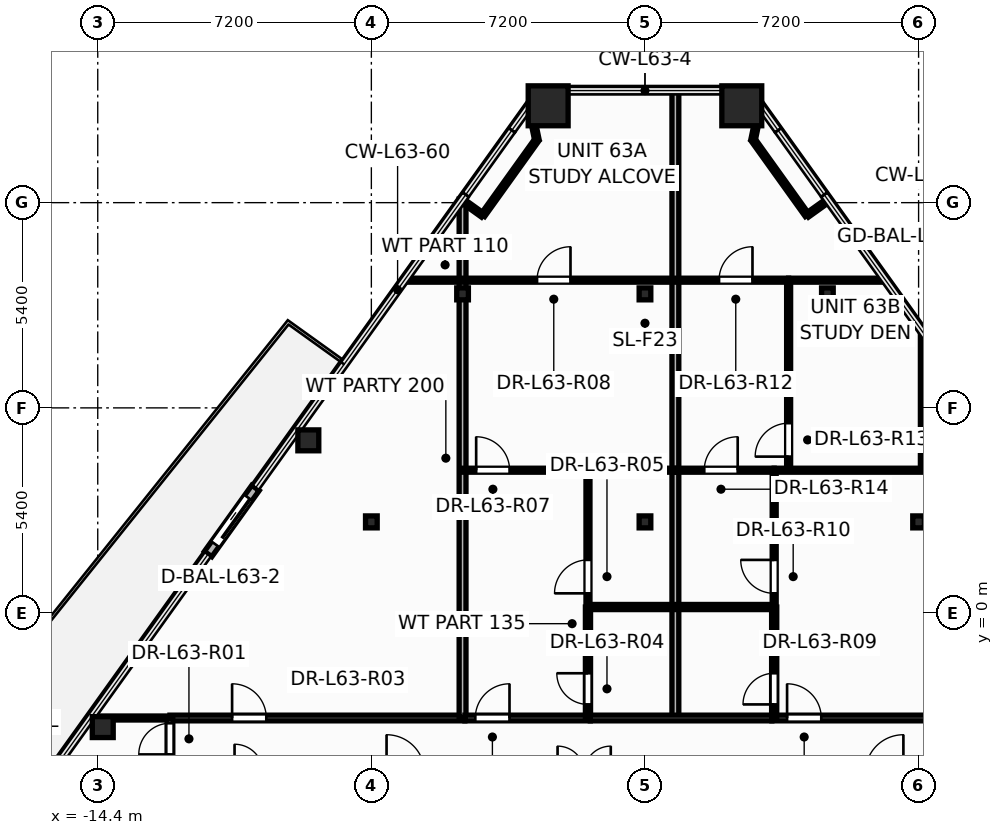
"""IFC4 building model, lengths in metres.
Left out: names, types, materials, properties, quantities, classifications, styles, units other than length and angle.
Written with IfcOpenShell. Run it as: python <this file> out.ifc"""

import sys

from ifc_helpers import new_model, si_unit, direction, frame, frame_2d, origin, origin_2d, place, context, subcontext, project, spatial, rectangle, hollow_rectangle, hollow_circle, i_section, extrude, element, fill, save


model = new_model("IFC4")
c1 = context("Model", 3, precision=1e-05, world=origin(), true_north=direction((0.0, 1.0)))
c2 = subcontext(c1, "Body", "Model", "MODEL_VIEW")
j1 = project(units=[si_unit("LENGTHUNIT", "METRE"), si_unit("PLANEANGLEUNIT", "RADIAN")], contexts=[c1])
p1 = place(None, origin())
s1 = spatial("IfcSite", under=j1, at=p1, CompositionType="ELEMENT")
p2 = place(p1, origin())
s2 = spatial("IfcBuilding", under=s1, at=p2, CompositionType="ELEMENT")
p3 = place(p2, frame((0.0, 0.0, 240.6)))
s3 = spatial("IfcBuildingStorey", under=s2, at=p3, CompositionType="ELEMENT", Elevation=240.6)
for number, where, z_axis, x_axis in (
    (1, (2.548, 13.349, 0.0), (0.0, 0.0, 1.0), (1.0, 0.0, 0.0)),
    (2, (-2.548, 13.349, 0.0), (0.0, 0.0, 1.0), (1.0, 0.0, 0.0)),
):
    element("IfcColumn", number, at=place(p3, frame(where, z_axis=z_axis, x_axis=x_axis)), inside=s3, PredefinedType="COLUMN", context=c2, shape_type="SweptSolid", body=[
        extrude(hollow_rectangle(XDim=1.05, YDim=1.05, WallThickness=0.045, at=origin_2d()), origin(), (0.0, 0.0, 1.0), 3.6),
    ])
for number, where, z_axis, x_axis in (
    (3, (-8.858, 4.546, 0.0), (0.0, 0.0, 1.0), (1.0, 0.0, 0.0)),
    (4, (-14.268, -2.999, 0.0), (0.0, 0.0, 1.0), (1.0, 0.0, 0.0)),
):
    element("IfcColumn", number, at=place(p3, frame(where, z_axis=z_axis, x_axis=x_axis)), inside=s3, PredefinedType="COLUMN", context=c2, shape_type="SweptSolid", body=[
        extrude(hollow_circle(Radius=0.275, WallThickness=0.024, at=origin_2d()), origin(), (0.0, 0.0, 1.0), 3.6),
    ])
for number, where, z_axis, x_axis in (
    (5, (-7.2, 2.4, 0.0), (0.0, 0.0, 1.0), (1.0, 0.0, 0.0)),
    (6, (0.0, 2.4, 0.0), (0.0, 0.0, 1.0), (1.0, 0.0, 0.0)),
    (7, (7.2, 2.4, 0.0), (0.0, 0.0, 1.0), (1.0, 0.0, 0.0)),
    (8, (-4.8, 8.4, 0.0), (0.0, 0.0, 1.0), (1.0, 0.0, 0.0)),
    (9, (0.0, 8.4, 0.0), (0.0, 0.0, 1.0), (1.0, 0.0, 0.0)),
    (10, (4.8, 8.4, 0.0), (0.0, 0.0, 1.0), (1.0, 0.0, 0.0)),
):
    element("IfcColumn", number, at=place(p3, frame(where, z_axis=z_axis, x_axis=x_axis)), inside=s3, PredefinedType="COLUMN", context=c2, shape_type="SweptSolid", body=[
        extrude(i_section(OverallWidth=0.307, OverallDepth=0.314, WebThickness=0.012, FlangeThickness=0.019, at=origin_2d()), origin(), (0.0, 0.0, 1.0), 3.6),
    ])
p4 = place(p3, frame((-10.249, 3.293, -0.015), z_axis=(0.0, 0.0, 1.0), x_axis=(-0.58265081445, -0.812722602381, 0.0)))
e11 = element("IfcWall", 11, at=p4, inside=s3, PredefinedType="STANDARD", context=c2, shape_type="SweptSolid", body=[
    extrude(rectangle(XDim=2.14, YDim=0.24, at=frame_2d((1.07, 0.0))), origin(), (0.0, 0.0, 1.0), 2.813),
])
p5 = place(p4, frame((0.32, 0.0, 0.015)))
e12 = element("IfcOpeningElement", 12, at=p5, cuts=e11, PredefinedType="OPENING", context=c2, shape_type="SweptSolid", body=[
    extrude(rectangle(XDim=1.506, YDim=2.204, at=frame_2d((0.75, 1.102))), frame((0.0, 0.13, 0.0), z_axis=(0.0, -1.0, 0.0), x_axis=(1.0, 0.0, 0.0)), (0.0, 0.0, 1.0), 0.26),
])
p6 = place(p3, frame((3.34, -2.76, 0.0), z_axis=(0.0, 0.0, 1.0), x_axis=(1.0, 0.0, 0.0)))
e13 = element("IfcWall", 13, at=p6, inside=s3, PredefinedType="PARTITIONING", context=c2, shape_type="SweptSolid", body=[
    extrude(rectangle(XDim=9.16, YDim=0.15, at=frame_2d((4.58, 0.0))), origin(), (0.0, 0.0, 1.0), 2.255),
])
p7 = place(p6, frame((0.399, 0.0, 0.0)))
e14 = element("IfcOpeningElement", 14, at=p7, cuts=e13, PredefinedType="OPENING", context=c2, shape_type="SweptSolid", body=[
    extrude(rectangle(XDim=0.906, YDim=2.104, at=frame_2d((0.45, 1.052))), frame((0.0, 0.085, 0.0), z_axis=(0.0, -1.0, 0.0), x_axis=(1.0, 0.0, 0.0)), (0.0, 0.0, 1.0), 0.17),
])
p8 = place(p3, frame((-12.5, -2.76, 0.0), z_axis=(0.0, 0.0, 1.0), x_axis=(1.0, 0.0, 0.0)))
e15 = element("IfcWall", 15, at=p8, inside=s3, PredefinedType="PARTITIONING", context=c2, shape_type="SweptSolid", body=[
    extrude(rectangle(XDim=7.76, YDim=0.15, at=frame_2d((3.88, 0.0))), origin(), (0.0, 0.0, 1.0), 2.255),
])
p9 = place(p8, frame((1.635, 0.0, 0.0)))
e16 = element("IfcOpeningElement", 16, at=p9, cuts=e15, PredefinedType="OPENING", context=c2, shape_type="SweptSolid", body=[
    extrude(rectangle(XDim=0.906, YDim=2.104, at=frame_2d((0.45, 1.052))), frame((0.0, 0.085, 0.0), z_axis=(0.0, -1.0, 0.0), x_axis=(1.0, 0.0, 0.0)), (0.0, 0.0, 1.0), 0.17),
])
p10 = place(p3, frame((-4.8, -2.74, 0.0), z_axis=(0.0, 0.0, 1.0), x_axis=(0.0, 1.0, 0.0)))
e17 = element("IfcWall", 17, at=p10, inside=s3, PredefinedType="PARTITIONING", context=c2, shape_type="SweptSolid", body=[
    extrude(rectangle(XDim=13.633, YDim=0.18, at=frame_2d((6.817, 0.0))), origin(), (0.0, 0.0, 1.0), 2.255),
])
p11 = place(p3, frame((-6.329, 8.76, 0.0), z_axis=(0.0, 0.0, 1.0), x_axis=(1.0, 0.0, 0.0)))
e18 = element("IfcWall", 18, at=p11, inside=s3, PredefinedType="PARTITIONING", context=c2, shape_type="SweptSolid", body=[
    extrude(rectangle(XDim=7.129, YDim=0.105, at=frame_2d((3.565, 0.0))), origin(), (0.0, 0.0, 1.0), 2.653),
])
p12 = place(p11, frame((3.49, 0.0, 0.0)))
e19 = element("IfcOpeningElement", 19, at=p12, cuts=e18, PredefinedType="OPENING", context=c2, shape_type="SweptSolid", body=[
    extrude(rectangle(XDim=0.886, YDim=2.104, at=frame_2d((0.44, 1.052))), frame((0.0, 0.062, 0.0), z_axis=(0.0, -1.0, 0.0), x_axis=(1.0, 0.0, 0.0)), (0.0, 0.0, 1.0), 0.125),
])
p13 = place(p3, frame((0.8, -2.76, 0.0), z_axis=(0.0, 0.0, 1.0), x_axis=(0.0, 1.0, 0.0)))
e20 = element("IfcWall", 20, at=p13, inside=s3, PredefinedType="PARTITIONING", context=c2, shape_type="SweptSolid", body=[
    extrude(rectangle(XDim=16.509, YDim=0.18, at=frame_2d((8.254, 0.0))), origin(), (0.0, 0.0, 1.0), 2.255),
])
p14 = place(p3, frame((3.78, 3.76, 0.0), z_axis=(0.0, 0.0, 1.0), x_axis=(0.0, 1.0, 0.0)))
e21 = element("IfcWall", 21, at=p14, inside=s3, PredefinedType="PARTITIONING", context=c2, shape_type="SweptSolid", body=[
    extrude(rectangle(XDim=5.0, YDim=0.105, at=frame_2d((2.5, 0.0))), origin(), (0.0, 0.0, 1.0), 2.653),
])
p15 = place(p14, frame((0.358, 0.0, 0.0)))
e22 = element("IfcOpeningElement", 22, at=p15, cuts=e21, PredefinedType="OPENING", context=c2, shape_type="SweptSolid", body=[
    extrude(rectangle(XDim=0.886, YDim=2.104, at=frame_2d((0.44, 1.052))), frame((0.0, 0.062, 0.0), z_axis=(0.0, -1.0, 0.0), x_axis=(1.0, 0.0, 0.0)), (0.0, 0.0, 1.0), 0.125),
])
p16 = place(p3, frame((7.3, 3.76, 0.0), z_axis=(0.0, 0.0, 1.0), x_axis=(0.0, 1.0, 0.0)))
e23 = element("IfcWall", 23, at=p16, inside=s3, PredefinedType="PARTITIONING", context=c2, shape_type="SweptSolid", body=[
    extrude(rectangle(XDim=3.646, YDim=0.105, at=frame_2d((1.823, 0.0))), origin(), (0.0, 0.0, 1.0), 2.653),
])
p17 = place(p3, frame((-1.5, 0.16, 0.0), z_axis=(0.0, 0.0, 1.0), x_axis=(0.0, 1.0, 0.0)))
e24 = element("IfcWall", 24, at=p17, inside=s3, PredefinedType="PARTITIONING", context=c2, shape_type="SweptSolid", body=[
    extrude(rectangle(XDim=3.6, YDim=0.105, at=frame_2d((1.8, 0.0))), origin(), (0.0, 0.0, 1.0), 2.255),
])
p18 = place(p17, frame((0.36, 0.0, 0.0)))
e25 = element("IfcOpeningElement", 25, at=p18, cuts=e24, PredefinedType="OPENING", context=c2, shape_type="SweptSolid", body=[
    extrude(rectangle(XDim=0.886, YDim=2.104, at=frame_2d((0.44, 1.052))), frame((0.0, 0.062, 0.0), z_axis=(0.0, -1.0, 0.0), x_axis=(1.0, 0.0, 0.0)), (0.0, 0.0, 1.0), 0.125),
])
p19 = place(p3, frame((3.4, 0.16, 0.0), z_axis=(0.0, 0.0, 1.0), x_axis=(0.0, 1.0, 0.0)))
e26 = element("IfcWall", 26, at=p19, inside=s3, PredefinedType="PARTITIONING", context=c2, shape_type="SweptSolid", body=[
    extrude(rectangle(XDim=3.6, YDim=0.105, at=frame_2d((1.8, 0.0))), origin(), (0.0, 0.0, 1.0), 2.255),
])
p20 = place(p19, frame((0.36, 0.0, 0.0)))
e27 = element("IfcOpeningElement", 27, at=p20, cuts=e26, PredefinedType="OPENING", context=c2, shape_type="SweptSolid", body=[
    extrude(rectangle(XDim=0.886, YDim=2.104, at=frame_2d((0.44, 1.052))), frame((0.0, 0.062, 0.0), z_axis=(0.0, -1.0, 0.0), x_axis=(1.0, 0.0, 0.0)), (0.0, 0.0, 1.0), 0.125),
])
p21 = place(p3, frame((3.4, 3.76, 0.0), z_axis=(0.0, 0.0, 1.0), x_axis=(1.0, 0.0, 0.0)))
e28 = element("IfcWall", 28, at=p21, inside=s3, PredefinedType="PARTITIONING", context=c2, shape_type="SweptSolid", body=[
    extrude(rectangle(XDim=3.9, YDim=0.105, at=frame_2d((1.95, 0.0))), origin(), (0.0, 0.0, 1.0), 2.653),
])
p22 = place(p3, frame((-4.738, -2.76, 0.0), z_axis=(0.0, 0.0, 1.0), x_axis=(1.0, 0.0, 0.0)))
e29 = element("IfcWall", 29, at=p22, inside=s3, PredefinedType="PARTITIONING", context=c2, shape_type="SweptSolid", body=[
    extrude(rectangle(XDim=3.298, YDim=0.15, at=frame_2d((1.649, 0.0))), origin(), (0.0, 0.0, 1.0), 2.899),
])
p23 = place(p22, frame((0.273, 0.0, 0.0)))
e30 = element("IfcOpeningElement", 30, at=p23, cuts=e29, PredefinedType="OPENING", context=c2, shape_type="SweptSolid", body=[
    extrude(rectangle(XDim=0.906, YDim=2.104, at=frame_2d((0.45, 1.052))), frame((0.0, 0.085, 0.0), z_axis=(0.0, -1.0, 0.0), x_axis=(1.0, 0.0, 0.0)), (0.0, 0.0, 1.0), 0.17),
])
p24 = place(p3, frame((-4.8, 3.76, 0.0), z_axis=(0.0, 0.0, 1.0), x_axis=(1.0, 0.0, 0.0)))
e31 = element("IfcWall", 31, at=p24, inside=s3, PredefinedType="PARTITIONING", context=c2, shape_type="SweptSolid", body=[
    extrude(rectangle(XDim=3.3, YDim=0.105, at=frame_2d((1.65, 0.0))), origin(), (0.0, 0.0, 1.0), 2.899),
])
p25 = place(p24, frame((0.358, 0.0, 0.0)))
e32 = element("IfcOpeningElement", 32, at=p25, cuts=e31, PredefinedType="OPENING", context=c2, shape_type="SweptSolid", body=[
    extrude(rectangle(XDim=0.886, YDim=2.104, at=frame_2d((0.44, 1.052))), frame((0.0, 0.062, 0.0), z_axis=(0.0, -1.0, 0.0), x_axis=(1.0, 0.0, 0.0)), (0.0, 0.0, 1.0), 0.125),
])
p26 = place(p3, frame((0.8, 8.76, 0.0), z_axis=(0.0, 0.0, 1.0), x_axis=(1.0, 0.0, 0.0)))
e33 = element("IfcWall", 33, at=p26, inside=s3, PredefinedType="PARTITIONING", context=c2, shape_type="SweptSolid", body=[
    extrude(rectangle(XDim=2.98, YDim=0.105, at=frame_2d((1.49, 0.0))), origin(), (0.0, 0.0, 1.0), 3.28),
])
p27 = place(p26, frame((1.149, 0.0, 0.0)))
e34 = element("IfcOpeningElement", 34, at=p27, cuts=e33, PredefinedType="OPENING", context=c2, shape_type="SweptSolid", body=[
    extrude(rectangle(XDim=0.886, YDim=2.104, at=frame_2d((0.44, 1.052))), frame((0.0, 0.062, 0.0), z_axis=(0.0, -1.0, 0.0), x_axis=(1.0, 0.0, 0.0)), (0.0, 0.0, 1.0), 0.125),
])
p28 = place(p3, frame((-1.5, -2.76, 0.0), z_axis=(0.0, 0.0, 1.0), x_axis=(0.0, 1.0, 0.0)))
e35 = element("IfcWall", 35, at=p28, inside=s3, PredefinedType="PARTITIONING", context=c2, shape_type="SweptSolid", body=[
    extrude(rectangle(XDim=2.92, YDim=0.135, at=frame_2d((1.46, 0.0))), origin(), (0.0, 0.0, 1.0), 3.28),
])
p29 = place(p28, frame((0.357, 0.0, 0.0)))
e36 = element("IfcOpeningElement", 36, at=p29, cuts=e35, PredefinedType="OPENING", context=c2, shape_type="SweptSolid", body=[
    extrude(rectangle(XDim=0.826, YDim=2.104, at=frame_2d((0.41, 1.052))), frame((0.0, 0.078, 0.0), z_axis=(0.0, -1.0, 0.0), x_axis=(1.0, 0.0, 0.0)), (0.0, 0.0, 1.0), 0.155),
])
p30 = place(p3, frame((3.4, -2.76, 0.0), z_axis=(0.0, 0.0, 1.0), x_axis=(0.0, 1.0, 0.0)))
e37 = element("IfcWall", 37, at=p30, inside=s3, PredefinedType="PARTITIONING", context=c2, shape_type="SweptSolid", body=[
    extrude(rectangle(XDim=2.92, YDim=0.135, at=frame_2d((1.46, 0.0))), origin(), (0.0, 0.0, 1.0), 3.28),
])
p31 = place(p30, frame((0.357, 0.0, 0.0)))
e38 = element("IfcOpeningElement", 38, at=p31, cuts=e37, PredefinedType="OPENING", context=c2, shape_type="SweptSolid", body=[
    extrude(rectangle(XDim=0.826, YDim=2.104, at=frame_2d((0.41, 1.052))), frame((0.0, 0.078, 0.0), z_axis=(0.0, -1.0, 0.0), x_axis=(1.0, 0.0, 0.0)), (0.0, 0.0, 1.0), 0.155),
])
p32 = place(p3, frame((-1.438, -2.76, 0.0), z_axis=(0.0, 0.0, 1.0), x_axis=(1.0, 0.0, 0.0)))
e39 = element("IfcWall", 39, at=p32, inside=s3, PredefinedType="PARTITIONING", context=c2, shape_type="SweptSolid", body=[
    extrude(rectangle(XDim=4.776, YDim=0.15, at=frame_2d((2.388, 0.0))), origin(), (0.0, 0.0, 1.0), 2.255),
])
p33 = place(p3, frame((-1.5, 0.16, 0.0), z_axis=(0.0, 0.0, 1.0), x_axis=(1.0, 0.0, 0.0)))
e40 = element("IfcWall", 40, at=p33, inside=s3, PredefinedType="PARTITIONING", context=c2, shape_type="SweptSolid", body=[
    extrude(rectangle(XDim=4.9, YDim=0.135, at=frame_2d((2.45, 0.0))), origin(), (0.0, 0.0, 1.0), 2.255),
])
p34 = place(p3, frame((0.8, 3.76, 0.0), z_axis=(0.0, 0.0, 1.0), x_axis=(1.0, 0.0, 0.0)))
e41 = element("IfcWall", 41, at=p34, inside=s3, PredefinedType="PARTITIONING", context=c2, shape_type="SweptSolid", body=[
    extrude(rectangle(XDim=2.6, YDim=0.105, at=frame_2d((1.3, 0.0))), origin(), (0.0, 0.0, 1.0), 2.899),
])
p35 = place(p34, frame((0.76, 0.0, 0.0)))
e42 = element("IfcOpeningElement", 42, at=p35, cuts=e41, PredefinedType="OPENING", context=c2, shape_type="SweptSolid", body=[
    extrude(rectangle(XDim=0.886, YDim=2.104, at=frame_2d((0.44, 1.052))), frame((0.0, 0.062, 0.0), z_axis=(0.0, -1.0, 0.0), x_axis=(1.0, 0.0, 0.0)), (0.0, 0.0, 1.0), 0.125),
])
p36 = place(p3, frame((3.78, 8.76, 0.0), z_axis=(0.0, 0.0, 1.0), x_axis=(1.0, 0.0, 0.0)))
e43 = element("IfcWall", 43, at=p36, inside=s3, PredefinedType="PARTITIONING", context=c2, shape_type="SweptSolid", body=[
    extrude(rectangle(XDim=2.549, YDim=0.105, at=frame_2d((1.275, 0.0))), origin(), (0.0, 0.0, 1.0), 2.653),
])
for number, where, z_axis, x_axis in (
    (44, (-2.845, 12.453, 0.0), (0.0, 0.0, 1.0), (-0.583, -0.813, 0.0)),
    (45, (4.268, 10.469, 0.0), (0.0, 0.0, 1.0), (-0.583, 0.813, 0.0)),
):
    element("IfcWall", number, at=place(p3, frame(where, z_axis=z_axis, x_axis=x_axis)), inside=s3, PredefinedType="PARTITIONING", context=c2, shape_type="SweptSolid", body=[
        extrude(rectangle(XDim=2.441, YDim=0.12, at=frame_2d((1.221, 0.0))), origin(), (0.0, 0.0, 1.0), 2.653),
    ])
p37 = place(p3, frame((-1.5, 3.76, 0.0), z_axis=(0.0, 0.0, 1.0), x_axis=(1.0, 0.0, 0.0)))
e46 = element("IfcWall", 46, at=p37, inside=s3, PredefinedType="PARTITIONING", context=c2, shape_type="SweptSolid", body=[
    extrude(rectangle(XDim=2.3, YDim=0.105, at=frame_2d((1.15, 0.0))), origin(), (0.0, 0.0, 1.0), 2.255),
])
p38 = place(p3, frame((-14.588, -2.76, 0.0), z_axis=(0.0, 0.0, 1.0), x_axis=(1.0, 0.0, 0.0)))
e47 = element("IfcWall", 47, at=p38, inside=s3, PredefinedType="PARTITIONING", context=c2, shape_type="SweptSolid", body=[
    extrude(rectangle(XDim=2.088, YDim=0.105, at=frame_2d((1.044, 0.0))), origin(), (0.0, 0.0, 1.0), 2.653),
])
p39 = place(p3, frame((-12.5, -4.24, 0.0), z_axis=(0.0, 0.0, 1.0), x_axis=(0.0, 1.0, 0.0)))
e48 = element("IfcWall", 48, at=p39, inside=s3, PredefinedType="PARTITIONING", context=c2, shape_type="SweptSolid", body=[
    extrude(rectangle(XDim=1.48, YDim=0.15, at=frame_2d((0.74, 0.0))), origin(), (0.0, 0.0, 1.0), 2.255),
])
p40 = place(p39, frame((0.522, 0.0, 0.0)))
e49 = element("IfcOpeningElement", 49, at=p40, cuts=e48, PredefinedType="OPENING", context=c2, shape_type="SweptSolid", body=[
    extrude(rectangle(XDim=0.826, YDim=2.104, at=frame_2d((0.41, 1.052))), frame((0.0, 0.085, 0.0), z_axis=(0.0, -1.0, 0.0), x_axis=(1.0, 0.0, 0.0)), (0.0, 0.0, 1.0), 0.17),
])
for number, where, z_axis, x_axis in (
    (50, (-3.017, 13.283, 0.0), (0.0, 0.0, 1.0), (0.203, -0.979, 0.0)),
    (51, (2.845, 12.453, 0.0), (0.0, 0.0, 1.0), (0.203, 0.979, 0.0)),
):
    element("IfcWall", number, at=place(p3, frame(where, z_axis=z_axis, x_axis=x_axis)), inside=s3, PredefinedType="PARTITIONING", context=c2, shape_type="SweptSolid", body=[
        extrude(rectangle(XDim=0.848, YDim=0.12, at=frame_2d((0.424, 0.0))), origin(), (0.0, 0.0, 1.0), 2.653),
    ])
for number, where, z_axis, x_axis in (
    (52, (-4.268, 10.469, 0.0), (0.0, 0.0, 1.0), (-0.813, 0.583, 0.0)),
    (53, (4.812, 10.859, 0.0), (0.0, 0.0, 1.0), (-0.813, -0.583, 0.0)),
):
    element("IfcWall", number, at=place(p3, frame(where, z_axis=z_axis, x_axis=x_axis)), inside=s3, PredefinedType="PARTITIONING", context=c2, shape_type="SweptSolid", body=[
        extrude(rectangle(XDim=0.67, YDim=0.12, at=frame_2d((0.335, 0.0))), origin(), (0.0, 0.0, 1.0), 2.798),
    ])
p41 = place(p5, origin())
e54 = element("IfcDoor", 54, at=p41, inside=s3, OperationType="SLIDING_TO_RIGHT", PredefinedType="DOOR", context=c2, shape_type="SweptSolid", body=[
    extrude(rectangle(XDim=1.5, YDim=2.2, at=frame_2d((0.75, 1.1))), frame((0.0, 0.025, 0.0), z_axis=(0.0, -1.0, 0.0), x_axis=(1.0, 0.0, 0.0)), (0.0, 0.0, 1.0), 0.05),
])
fill(e12, e54)
p42 = place(p40, origin())
e55 = element("IfcDoor", 55, at=p42, inside=s3, OperationType="SINGLE_SWING_LEFT", PredefinedType="DOOR", context=c2, shape_type="SweptSolid", body=[
    extrude(rectangle(XDim=0.82, YDim=2.1, at=frame_2d((0.41, 1.05))), frame((0.0, 0.025, 0.0), z_axis=(0.0, -1.0, 0.0), x_axis=(1.0, 0.0, 0.0)), (0.0, 0.0, 1.0), 0.05),
])
fill(e49, e55)
p43 = place(p9, origin())
e56 = element("IfcDoor", 56, at=p43, inside=s3, OperationType="SINGLE_SWING_LEFT", PredefinedType="DOOR", context=c2, shape_type="SweptSolid", body=[
    extrude(rectangle(XDim=0.9, YDim=2.1, at=frame_2d((0.45, 1.05))), frame((0.0, 0.025, 0.0), z_axis=(0.0, -1.0, 0.0), x_axis=(1.0, 0.0, 0.0)), (0.0, 0.0, 1.0), 0.05),
])
fill(e16, e56)
p44 = place(p29, origin())
e57 = element("IfcDoor", 57, at=p44, inside=s3, OperationType="SINGLE_SWING_RIGHT", PredefinedType="DOOR", context=c2, shape_type="SweptSolid", body=[
    extrude(rectangle(XDim=0.82, YDim=2.1, at=frame_2d((0.41, 1.05))), frame((0.0, 0.025, 0.0), z_axis=(0.0, -1.0, 0.0), x_axis=(1.0, 0.0, 0.0)), (0.0, 0.0, 1.0), 0.05),
])
fill(e36, e57)
p45 = place(p18, origin())
e58 = element("IfcDoor", 58, at=p45, inside=s3, OperationType="SINGLE_SWING_LEFT", PredefinedType="DOOR", context=c2, shape_type="SweptSolid", body=[
    extrude(rectangle(XDim=0.88, YDim=2.1, at=frame_2d((0.44, 1.05))), frame((0.0, 0.025, 0.0), z_axis=(0.0, -1.0, 0.0), x_axis=(1.0, 0.0, 0.0)), (0.0, 0.0, 1.0), 0.05),
])
fill(e25, e58)
p46 = place(p23, origin())
e59 = element("IfcDoor", 59, at=p46, inside=s3, OperationType="SINGLE_SWING_RIGHT", PredefinedType="DOOR", context=c2, shape_type="SweptSolid", body=[
    extrude(rectangle(XDim=0.9, YDim=2.1, at=frame_2d((0.45, 1.05))), frame((0.0, 0.025, 0.0), z_axis=(0.0, -1.0, 0.0), x_axis=(1.0, 0.0, 0.0)), (0.0, 0.0, 1.0), 0.05),
])
fill(e30, e59)
p47 = place(p25, origin())
e60 = element("IfcDoor", 60, at=p47, inside=s3, OperationType="SINGLE_SWING_LEFT", PredefinedType="DOOR", context=c2, shape_type="SweptSolid", body=[
    extrude(rectangle(XDim=0.88, YDim=2.1, at=frame_2d((0.44, 1.05))), frame((0.0, 0.025, 0.0), z_axis=(0.0, -1.0, 0.0), x_axis=(1.0, 0.0, 0.0)), (0.0, 0.0, 1.0), 0.05),
])
fill(e32, e60)
p48 = place(p12, origin())
e61 = element("IfcDoor", 61, at=p48, inside=s3, OperationType="SINGLE_SWING_RIGHT", PredefinedType="DOOR", context=c2, shape_type="SweptSolid", body=[
    extrude(rectangle(XDim=0.88, YDim=2.1, at=frame_2d((0.44, 1.05))), frame((0.0, 0.025, 0.0), z_axis=(0.0, -1.0, 0.0), x_axis=(1.0, 0.0, 0.0)), (0.0, 0.0, 1.0), 0.05),
])
fill(e19, e61)
p49 = place(p31, origin())
e62 = element("IfcDoor", 62, at=p49, inside=s3, OperationType="SINGLE_SWING_LEFT", PredefinedType="DOOR", context=c2, shape_type="SweptSolid", body=[
    extrude(rectangle(XDim=0.82, YDim=2.1, at=frame_2d((0.41, 1.05))), frame((0.0, 0.025, 0.0), z_axis=(0.0, -1.0, 0.0), x_axis=(1.0, 0.0, 0.0)), (0.0, 0.0, 1.0), 0.05),
])
fill(e38, e62)
p50 = place(p20, origin())
e63 = element("IfcDoor", 63, at=p50, inside=s3, OperationType="SINGLE_SWING_RIGHT", PredefinedType="DOOR", context=c2, shape_type="SweptSolid", body=[
    extrude(rectangle(XDim=0.88, YDim=2.1, at=frame_2d((0.44, 1.05))), frame((0.0, 0.025, 0.0), z_axis=(0.0, -1.0, 0.0), x_axis=(1.0, 0.0, 0.0)), (0.0, 0.0, 1.0), 0.05),
])
fill(e27, e63)
p51 = place(p7, origin())
e64 = element("IfcDoor", 64, at=p51, inside=s3, OperationType="SINGLE_SWING_LEFT", PredefinedType="DOOR", context=c2, shape_type="SweptSolid", body=[
    extrude(rectangle(XDim=0.9, YDim=2.1, at=frame_2d((0.45, 1.05))), frame((0.0, 0.025, 0.0), z_axis=(0.0, -1.0, 0.0), x_axis=(1.0, 0.0, 0.0)), (0.0, 0.0, 1.0), 0.05),
])
fill(e14, e64)
p52 = place(p27, origin())
e65 = element("IfcDoor", 65, at=p52, inside=s3, OperationType="SINGLE_SWING_RIGHT", PredefinedType="DOOR", context=c2, shape_type="SweptSolid", body=[
    extrude(rectangle(XDim=0.88, YDim=2.1, at=frame_2d((0.44, 1.05))), frame((0.0, 0.025, 0.0), z_axis=(0.0, -1.0, 0.0), x_axis=(1.0, 0.0, 0.0)), (0.0, 0.0, 1.0), 0.05),
])
fill(e34, e65)
p53 = place(p15, origin())
e66 = element("IfcDoor", 66, at=p53, inside=s3, OperationType="SINGLE_SWING_LEFT", PredefinedType="DOOR", context=c2, shape_type="SweptSolid", body=[
    extrude(rectangle(XDim=0.88, YDim=2.1, at=frame_2d((0.44, 1.05))), frame((0.0, 0.025, 0.0), z_axis=(0.0, -1.0, 0.0), x_axis=(1.0, 0.0, 0.0)), (0.0, 0.0, 1.0), 0.05),
])
fill(e22, e66)
p54 = place(p35, origin())
e67 = element("IfcDoor", 67, at=p54, inside=s3, OperationType="SINGLE_SWING_RIGHT", PredefinedType="DOOR", context=c2, shape_type="SweptSolid", body=[
    extrude(rectangle(XDim=0.88, YDim=2.1, at=frame_2d((0.44, 1.05))), frame((0.0, 0.025, 0.0), z_axis=(0.0, -1.0, 0.0), x_axis=(1.0, 0.0, 0.0)), (0.0, 0.0, 1.0), 0.05),
])
fill(e42, e67)
save(model, sys.argv[1])
